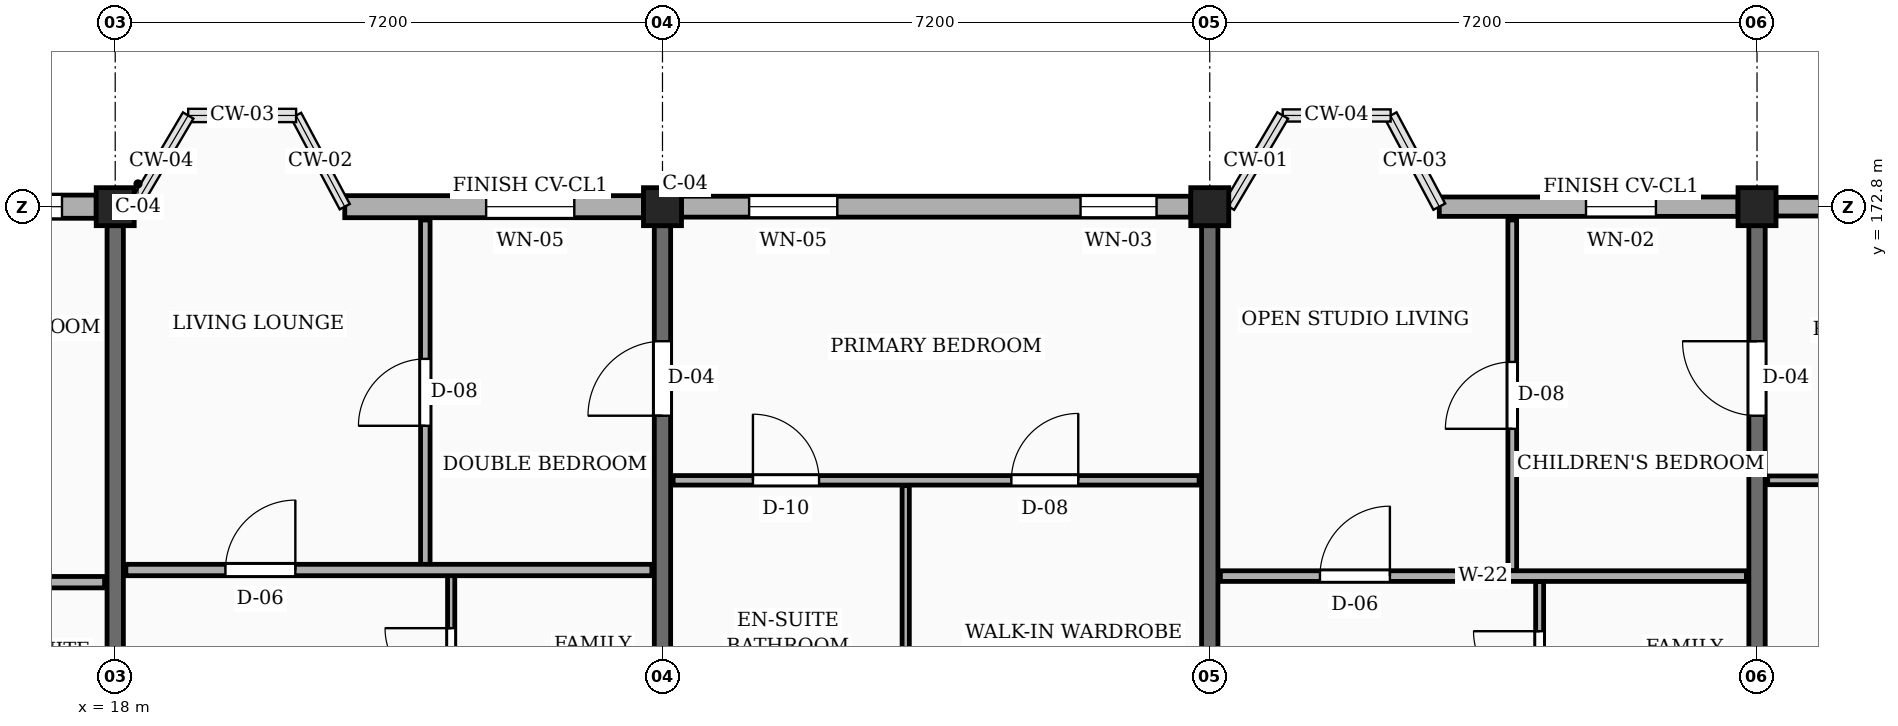
"""IFC4 building model, lengths in metres.
Left out: names, types, materials, properties, quantities, classifications, styles, units other than length and angle.
Written with IfcOpenShell. Run it as: python <this file> out.ifc"""

import sys

from ifc_helpers import new_model, si_unit, direction, frame, frame_2d, origin, origin_2d, place, context, subcontext, project, spatial, rectangle, extrude, element, fill, save


model = new_model("IFC4")
c1 = context("Model", 3, precision=1e-05, world=origin(), true_north=direction((0.0, 1.0)))
c2 = subcontext(c1, "Body", "Model", "MODEL_VIEW")
j1 = project(units=[si_unit("LENGTHUNIT", "METRE"), si_unit("PLANEANGLEUNIT", "RADIAN")], contexts=[c1])
p1 = place(None, origin())
s1 = spatial("IfcSite", under=j1, at=p1, CompositionType="ELEMENT")
p2 = place(p1, origin())
s2 = spatial("IfcBuilding", under=s1, at=p2, CompositionType="ELEMENT")
p3 = place(p2, frame((0.0, 0.0, 29.7)))
s3 = spatial("IfcBuildingStorey", under=s2, at=p3, CompositionType="ELEMENT", Elevation=29.7)
for number, where, z_axis, x_axis in (
    (1, (18.0, 172.8, 0.0), (0.0, 0.0, 1.0), (1.0, 0.0, 0.0)),
    (2, (25.2, 172.8, 0.0), (0.0, 0.0, 1.0), (1.0, 0.0, 0.0)),
    (3, (32.4, 172.8, 0.0), (0.0, 0.0, 1.0), (1.0, 0.0, 0.0)),
    (4, (39.6, 172.8, 0.0), (0.0, 0.0, 1.0), (1.0, 0.0, 0.0)),
):
    element("IfcColumn", number, at=place(p3, frame(where, z_axis=z_axis, x_axis=x_axis)), inside=s3, PredefinedType="COLUMN", context=c2, shape_type="SweptSolid", body=[
        extrude(rectangle(XDim=0.5, YDim=0.5, at=origin_2d()), origin(), (0.0, 0.0, 1.0), 3.15),
    ])
p4 = place(p3, frame((18.0, 165.9, 0.0), z_axis=(0.0, 0.0, 1.0), x_axis=(0.0, 1.0, 0.0)))
e5 = element("IfcWall", 5, at=p4, inside=s3, PredefinedType="SOLIDWALL", context=c2, shape_type="SweptSolid", body=[
    extrude(rectangle(XDim=6.65, YDim=0.215, at=frame_2d((3.325, 0.0))), origin(), (0.0, 0.0, 1.0), 2.185),
])
p5 = place(p3, frame((25.2, 165.9, 0.0), z_axis=(0.0, 0.0, 1.0), x_axis=(0.0, 1.0, 0.0)))
e6 = element("IfcWall", 6, at=p5, inside=s3, PredefinedType="SOLIDWALL", context=c2, shape_type="SweptSolid", body=[
    extrude(rectangle(XDim=6.65, YDim=0.215, at=frame_2d((3.325, 0.0))), origin(), (0.0, 0.0, 1.0), 2.185),
])
p6 = place(p5, frame((4.15, 0.0, 0.0)))
e7 = element("IfcOpeningElement", 7, at=p6, cuts=e6, PredefinedType="OPENING", context=c2, shape_type="SweptSolid", body=[
    extrude(rectangle(XDim=0.98, YDim=2.12, at=frame_2d((0.49, 1.06))), frame((0.0, 0.118, 0.0), z_axis=(0.0, -1.0, 0.0), x_axis=(1.0, 0.0, 0.0)), (0.0, 0.0, 1.0), 0.235),
])
p7 = place(p3, frame((32.4, 165.9, 0.0), z_axis=(0.0, 0.0, 1.0), x_axis=(0.0, 1.0, 0.0)))
e8 = element("IfcWall", 8, at=p7, inside=s3, PredefinedType="SOLIDWALL", context=c2, shape_type="SweptSolid", body=[
    extrude(rectangle(XDim=6.65, YDim=0.215, at=frame_2d((3.325, 0.0))), origin(), (0.0, 0.0, 1.0), 2.185),
])
p8 = place(p3, frame((39.6, 165.9, 0.0), z_axis=(0.0, 0.0, 1.0), x_axis=(0.0, 1.0, 0.0)))
e9 = element("IfcWall", 9, at=p8, inside=s3, PredefinedType="SOLIDWALL", context=c2, shape_type="SweptSolid", body=[
    extrude(rectangle(XDim=6.65, YDim=0.215, at=frame_2d((3.325, 0.0))), origin(), (0.0, 0.0, 1.0), 2.185),
])
p9 = place(p8, frame((4.15, 0.0, 0.0)))
e10 = element("IfcOpeningElement", 10, at=p9, cuts=e9, PredefinedType="OPENING", context=c2, shape_type="SweptSolid", body=[
    extrude(rectangle(XDim=0.98, YDim=2.12, at=frame_2d((0.49, 1.06))), frame((0.0, 0.118, 0.0), z_axis=(0.0, -1.0, 0.0), x_axis=(1.0, 0.0, 0.0)), (0.0, 0.0, 1.0), 0.235),
])
p10 = place(p3, frame((46.55, 172.8, 0.0), z_axis=(0.0, 0.0, 1.0), x_axis=(-1.0, 0.0, 0.0)))
e11 = element("IfcWall", 11, at=p10, inside=s3, PredefinedType="SOLIDWALL", context=c2, shape_type="SweptSolid", body=[
    extrude(rectangle(XDim=6.7, YDim=0.245, at=frame_2d((3.35, 0.0))), origin(), (0.0, 0.0, 1.0), 2.455),
])
p11 = place(p10, frame((0.45, 0.0, 0.78)))
e12 = element("IfcOpeningElement", 12, at=p11, cuts=e11, PredefinedType="OPENING", context=c2, shape_type="SweptSolid", body=[
    extrude(rectangle(XDim=1.45, YDim=1.44, at=frame_2d((0.725, 0.72))), frame((0.0, 0.133, 0.0), z_axis=(0.0, -1.0, 0.0), x_axis=(1.0, 0.0, 0.0)), (0.0, 0.0, 1.0), 0.265),
])
p12 = place(p10, frame((4.65, 0.0, 0.78)))
e13 = element("IfcOpeningElement", 13, at=p12, cuts=e11, PredefinedType="OPENING", context=c2, shape_type="SweptSolid", body=[
    extrude(rectangle(XDim=0.92, YDim=1.15, at=frame_2d((0.46, 0.575))), frame((0.0, 0.133, 0.0), z_axis=(0.0, -1.0, 0.0), x_axis=(1.0, 0.0, 0.0)), (0.0, 0.0, 1.0), 0.265),
])
p13 = place(p3, frame((39.35, 172.8, 0.0), z_axis=(0.0, 0.0, 1.0), x_axis=(-1.0, 0.0, 0.0)))
e14 = element("IfcWall", 14, at=p13, inside=s3, PredefinedType="SOLIDWALL", context=c2, shape_type="SweptSolid", body=[
    extrude(rectangle(XDim=3.93, YDim=0.255, at=frame_2d((1.965, 0.0))), origin(), (0.0, 0.0, 1.0), 2.455),
])
p14 = place(p13, frame((1.08, 0.0, 0.78)))
e15 = element("IfcOpeningElement", 15, at=p14, cuts=e14, PredefinedType="OPENING", context=c2, shape_type="SweptSolid", body=[
    extrude(rectangle(XDim=0.92, YDim=1.15, at=frame_2d((0.46, 0.575))), frame((0.0, 0.137, 0.0), z_axis=(0.0, -1.0, 0.0), x_axis=(1.0, 0.0, 0.0)), (0.0, 0.0, 1.0), 0.275),
])
p15 = place(p3, frame((32.15, 172.8, 0.0), z_axis=(0.0, 0.0, 1.0), x_axis=(-1.0, 0.0, 0.0)))
e16 = element("IfcWall", 16, at=p15, inside=s3, PredefinedType="SOLIDWALL", context=c2, shape_type="SweptSolid", body=[
    extrude(rectangle(XDim=6.7, YDim=0.275, at=frame_2d((3.35, 0.0))), origin(), (0.0, 0.0, 1.0), 2.455),
])
p16 = place(p15, frame((0.45, 0.0, 0.78)))
e17 = element("IfcOpeningElement", 17, at=p16, cuts=e16, PredefinedType="OPENING", context=c2, shape_type="SweptSolid", body=[
    extrude(rectangle(XDim=1.0, YDim=1.15, at=frame_2d((0.5, 0.575))), frame((0.0, 0.147, 0.0), z_axis=(0.0, -1.0, 0.0), x_axis=(1.0, 0.0, 0.0)), (0.0, 0.0, 1.0), 0.295),
])
p17 = place(p15, frame((4.65, 0.0, 0.78)))
e18 = element("IfcOpeningElement", 18, at=p17, cuts=e16, PredefinedType="OPENING", context=c2, shape_type="SweptSolid", body=[
    extrude(rectangle(XDim=1.16, YDim=1.15, at=frame_2d((0.58, 0.575))), frame((0.0, 0.147, 0.0), z_axis=(0.0, -1.0, 0.0), x_axis=(1.0, 0.0, 0.0)), (0.0, 0.0, 1.0), 0.295),
])
p18 = place(p3, frame((24.95, 172.8, 0.0), z_axis=(0.0, 0.0, 1.0), x_axis=(-1.0, 0.0, 0.0)))
e19 = element("IfcWall", 19, at=p18, inside=s3, PredefinedType="SOLIDWALL", context=c2, shape_type="SweptSolid", body=[
    extrude(rectangle(XDim=3.93, YDim=0.29, at=frame_2d((1.965, 0.0))), origin(), (0.0, 0.0, 1.0), 2.455),
])
p19 = place(p18, frame((0.91, 0.0, 0.78)))
e20 = element("IfcOpeningElement", 20, at=p19, cuts=e19, PredefinedType="OPENING", context=c2, shape_type="SweptSolid", body=[
    extrude(rectangle(XDim=1.16, YDim=1.15, at=frame_2d((0.58, 0.575))), frame((0.0, 0.155, 0.0), z_axis=(0.0, -1.0, 0.0), x_axis=(1.0, 0.0, 0.0)), (0.0, 0.0, 1.0), 0.31),
])
p20 = place(p3, frame((17.75, 172.8, 0.0), z_axis=(0.0, 0.0, 1.0), x_axis=(-1.0, 0.0, 0.0)))
e21 = element("IfcWall", 21, at=p20, inside=s3, PredefinedType="SOLIDWALL", context=c2, shape_type="SweptSolid", body=[
    extrude(rectangle(XDim=6.7, YDim=0.305, at=frame_2d((3.35, 0.0))), origin(), (0.0, 0.0, 1.0), 2.455),
])
p21 = place(p20, frame((0.45, 0.0, 0.78)))
e22 = element("IfcOpeningElement", 22, at=p21, cuts=e21, PredefinedType="OPENING", context=c2, shape_type="SweptSolid", body=[
    extrude(rectangle(XDim=1.24, YDim=1.15, at=frame_2d((0.62, 0.575))), frame((0.0, 0.163, 0.0), z_axis=(0.0, -1.0, 0.0), x_axis=(1.0, 0.0, 0.0)), (0.0, 0.0, 1.0), 0.325),
])
p22 = place(p20, frame((4.65, 0.0, 0.78)))
e23 = element("IfcOpeningElement", 23, at=p22, cuts=e21, PredefinedType="OPENING", context=c2, shape_type="SweptSolid", body=[
    extrude(rectangle(XDim=1.4, YDim=1.15, at=frame_2d((0.7, 0.575))), frame((0.0, 0.163, 0.0), z_axis=(0.0, -1.0, 0.0), x_axis=(1.0, 0.0, 0.0)), (0.0, 0.0, 1.0), 0.325),
])
p23 = place(p3, frame((10.975, 167.86, 0.0), z_axis=(0.0, 0.0, 1.0), x_axis=(1.0, 0.0, 0.0)))
e24 = element("IfcWall", 24, at=p23, inside=s3, PredefinedType="PARTITIONING", context=c2, shape_type="SweptSolid", body=[
    extrude(rectangle(XDim=6.885, YDim=0.15, at=frame_2d((3.442, 0.0))), origin(), (0.0, 0.0, 1.0), 2.32),
])
p24 = place(p23, frame((1.275, 0.0, 0.0)))
e25 = element("IfcOpeningElement", 25, at=p24, cuts=e24, PredefinedType="OPENING", context=c2, shape_type="SweptSolid", body=[
    extrude(rectangle(XDim=0.95, YDim=2.1, at=frame_2d((0.475, 1.05))), frame((0.0, 0.085, 0.0), z_axis=(0.0, -1.0, 0.0), x_axis=(1.0, 0.0, 0.0)), (0.0, 0.0, 1.0), 0.17),
])
p25 = place(p3, frame((22.08, 168.09, 0.0), z_axis=(0.0, 0.0, 1.0), x_axis=(0.0, 1.0, 0.0)))
e26 = element("IfcWall", 26, at=p25, inside=s3, PredefinedType="PARTITIONING", context=c2, shape_type="SweptSolid", body=[
    extrude(rectangle(XDim=4.535, YDim=0.125, at=frame_2d((2.268, 0.0))), origin(), (0.0, 0.0, 1.0), 2.32),
])
p26 = place(p25, frame((1.827, 0.0, 0.0)))
e27 = element("IfcOpeningElement", 27, at=p26, cuts=e26, PredefinedType="OPENING", context=c2, shape_type="SweptSolid", body=[
    extrude(rectangle(XDim=0.88, YDim=2.08, at=frame_2d((0.44, 1.04))), frame((0.0, 0.073, 0.0), z_axis=(0.0, -1.0, 0.0), x_axis=(1.0, 0.0, 0.0)), (0.0, 0.0, 1.0), 0.145),
])
p27 = place(p3, frame((22.42, 165.69, 0.0), z_axis=(0.0, 0.0, 1.0), x_axis=(0.0, 1.0, 0.0)))
e28 = element("IfcWall", 28, at=p27, inside=s3, PredefinedType="PARTITIONING", context=c2, shape_type="SweptSolid", body=[
    extrude(rectangle(XDim=2.26, YDim=0.095, at=frame_2d((1.13, 0.0))), origin(), (0.0, 0.0, 1.0), 2.32),
])
p28 = place(p27, frame((0.695, 0.0, 0.0)))
e29 = element("IfcOpeningElement", 29, at=p28, cuts=e28, PredefinedType="OPENING", context=c2, shape_type="SweptSolid", body=[
    extrude(rectangle(XDim=0.87, YDim=2.05, at=frame_2d((0.435, 1.025))), frame((0.0, 0.058, 0.0), z_axis=(0.0, -1.0, 0.0), x_axis=(1.0, 0.0, 0.0)), (0.0, 0.0, 1.0), 0.115),
])
p29 = place(p3, frame((18.14, 168.02, 0.0), z_axis=(0.0, 0.0, 1.0), x_axis=(1.0, 0.0, 0.0)))
e30 = element("IfcWall", 30, at=p29, inside=s3, PredefinedType="PARTITIONING", context=c2, shape_type="SweptSolid", body=[
    extrude(rectangle(XDim=6.92, YDim=0.15, at=frame_2d((3.46, 0.0))), origin(), (0.0, 0.0, 1.0), 2.32),
])
p30 = place(p29, frame((1.31, 0.0, 0.0)))
e31 = element("IfcOpeningElement", 31, at=p30, cuts=e30, PredefinedType="OPENING", context=c2, shape_type="SweptSolid", body=[
    extrude(rectangle(XDim=0.92, YDim=2.1, at=frame_2d((0.46, 1.05))), frame((0.0, 0.085, 0.0), z_axis=(0.0, -1.0, 0.0), x_axis=(1.0, 0.0, 0.0)), (0.0, 0.0, 1.0), 0.17),
])
p31 = place(p3, frame((25.34, 169.2, 0.0), z_axis=(0.0, 0.0, 1.0), x_axis=(1.0, 0.0, 0.0)))
e32 = element("IfcWall", 32, at=p31, inside=s3, PredefinedType="PARTITIONING", context=c2, shape_type="SweptSolid", body=[
    extrude(rectangle(XDim=6.92, YDim=0.125, at=frame_2d((3.46, 0.0))), origin(), (0.0, 0.0, 1.0), 2.32),
])
p32 = place(p31, frame((1.05, 0.0, 0.0)))
e33 = element("IfcOpeningElement", 33, at=p32, cuts=e32, PredefinedType="OPENING", context=c2, shape_type="SweptSolid", body=[
    extrude(rectangle(XDim=0.87, YDim=2.05, at=frame_2d((0.435, 1.025))), frame((0.0, 0.073, 0.0), z_axis=(0.0, -1.0, 0.0), x_axis=(1.0, 0.0, 0.0)), (0.0, 0.0, 1.0), 0.145),
])
p33 = place(p31, frame((4.45, 0.0, 0.0)))
e34 = element("IfcOpeningElement", 34, at=p33, cuts=e32, PredefinedType="OPENING", context=c2, shape_type="SweptSolid", body=[
    extrude(rectangle(XDim=0.88, YDim=2.08, at=frame_2d((0.44, 1.04))), frame((0.0, 0.073, 0.0), z_axis=(0.0, -1.0, 0.0), x_axis=(1.0, 0.0, 0.0)), (0.0, 0.0, 1.0), 0.145),
])
p34 = place(p3, frame((28.4, 165.74, 0.0), z_axis=(0.0, 0.0, 1.0), x_axis=(0.0, 1.0, 0.0)))
e35 = element("IfcWall", 35, at=p34, inside=s3, PredefinedType="PARTITIONING", context=c2, shape_type="SweptSolid", body=[
    extrude(rectangle(XDim=3.39, YDim=0.095, at=frame_2d((1.695, 0.0))), origin(), (0.0, 0.0, 1.0), 2.32),
])
p35 = place(p3, frame((36.38, 168.01, 0.0), z_axis=(0.0, 0.0, 1.0), x_axis=(0.0, 1.0, 0.0)))
e36 = element("IfcWall", 36, at=p35, inside=s3, PredefinedType="PARTITIONING", context=c2, shape_type="SweptSolid", body=[
    extrude(rectangle(XDim=4.615, YDim=0.115, at=frame_2d((2.308, 0.0))), origin(), (0.0, 0.0, 1.0), 2.32),
])
p36 = place(p35, frame((1.867, 0.0, 0.0)))
e37 = element("IfcOpeningElement", 37, at=p36, cuts=e36, PredefinedType="OPENING", context=c2, shape_type="SweptSolid", body=[
    extrude(rectangle(XDim=0.88, YDim=2.08, at=frame_2d((0.44, 1.04))), frame((0.0, 0.067, 0.0), z_axis=(0.0, -1.0, 0.0), x_axis=(1.0, 0.0, 0.0)), (0.0, 0.0, 1.0), 0.135),
])
p37 = place(p3, frame((36.74, 165.69, 0.0), z_axis=(0.0, 0.0, 1.0), x_axis=(0.0, 1.0, 0.0)))
e38 = element("IfcWall", 38, at=p37, inside=s3, PredefinedType="PARTITIONING", context=c2, shape_type="SweptSolid", body=[
    extrude(rectangle(XDim=2.18, YDim=0.105, at=frame_2d((1.09, 0.0))), origin(), (0.0, 0.0, 1.0), 2.32),
])
p38 = place(p37, frame((0.655, 0.0, 0.0)))
e39 = element("IfcOpeningElement", 39, at=p38, cuts=e38, PredefinedType="OPENING", context=c2, shape_type="SweptSolid", body=[
    extrude(rectangle(XDim=0.87, YDim=2.05, at=frame_2d((0.435, 1.025))), frame((0.0, 0.062, 0.0), z_axis=(0.0, -1.0, 0.0), x_axis=(1.0, 0.0, 0.0)), (0.0, 0.0, 1.0), 0.125),
])
p39 = place(p3, frame((32.54, 167.94, 0.0), z_axis=(0.0, 0.0, 1.0), x_axis=(1.0, 0.0, 0.0)))
e40 = element("IfcWall", 40, at=p39, inside=s3, PredefinedType="PARTITIONING", context=c2, shape_type="SweptSolid", body=[
    extrude(rectangle(XDim=6.92, YDim=0.14, at=frame_2d((3.46, 0.0))), origin(), (0.0, 0.0, 1.0), 2.32),
])
p40 = place(p39, frame((1.31, 0.0, 0.0)))
e41 = element("IfcOpeningElement", 41, at=p40, cuts=e40, PredefinedType="OPENING", context=c2, shape_type="SweptSolid", body=[
    extrude(rectangle(XDim=0.92, YDim=2.1, at=frame_2d((0.46, 1.05))), frame((0.0, 0.08, 0.0), z_axis=(0.0, -1.0, 0.0), x_axis=(1.0, 0.0, 0.0)), (0.0, 0.0, 1.0), 0.16),
])
p41 = place(p3, frame((39.74, 169.2, 0.0), z_axis=(0.0, 0.0, 1.0), x_axis=(1.0, 0.0, 0.0)))
e42 = element("IfcWall", 42, at=p41, inside=s3, PredefinedType="PARTITIONING", context=c2, shape_type="SweptSolid", body=[
    extrude(rectangle(XDim=6.92, YDim=0.115, at=frame_2d((3.46, 0.0))), origin(), (0.0, 0.0, 1.0), 2.32),
])
p42 = place(p41, frame((1.05, 0.0, 0.0)))
e43 = element("IfcOpeningElement", 43, at=p42, cuts=e42, PredefinedType="OPENING", context=c2, shape_type="SweptSolid", body=[
    extrude(rectangle(XDim=0.87, YDim=2.05, at=frame_2d((0.435, 1.025))), frame((0.0, 0.067, 0.0), z_axis=(0.0, -1.0, 0.0), x_axis=(1.0, 0.0, 0.0)), (0.0, 0.0, 1.0), 0.135),
])
p43 = place(p41, frame((4.45, 0.0, 0.0)))
e44 = element("IfcOpeningElement", 44, at=p43, cuts=e42, PredefinedType="OPENING", context=c2, shape_type="SweptSolid", body=[
    extrude(rectangle(XDim=0.88, YDim=2.08, at=frame_2d((0.44, 1.04))), frame((0.0, 0.067, 0.0), z_axis=(0.0, -1.0, 0.0), x_axis=(1.0, 0.0, 0.0)), (0.0, 0.0, 1.0), 0.135),
])
p44 = place(p14, origin())
e45 = element("IfcWindow", 45, at=p44, inside=s3, PartitioningType="SINGLE_PANEL", PredefinedType="WINDOW", context=c2, shape_type="SweptSolid", body=[
    extrude(rectangle(XDim=0.92, YDim=1.15, at=frame_2d((0.46, 0.575))), frame((0.0, 0.03, 0.0), z_axis=(0.0, -1.0, 0.0), x_axis=(1.0, 0.0, 0.0)), (0.0, 0.0, 1.0), 0.06),
])
fill(e15, e45)
p45 = place(p16, origin())
e46 = element("IfcWindow", 46, at=p45, inside=s3, PartitioningType="SINGLE_PANEL", PredefinedType="WINDOW", context=c2, shape_type="SweptSolid", body=[
    extrude(rectangle(XDim=1.0, YDim=1.15, at=frame_2d((0.5, 0.575))), frame((0.0, 0.03, 0.0), z_axis=(0.0, -1.0, 0.0), x_axis=(1.0, 0.0, 0.0)), (0.0, 0.0, 1.0), 0.06),
])
fill(e17, e46)
p46 = place(p17, origin())
e47 = element("IfcWindow", 47, at=p46, inside=s3, PartitioningType="SINGLE_PANEL", PredefinedType="WINDOW", context=c2, shape_type="SweptSolid", body=[
    extrude(rectangle(XDim=1.16, YDim=1.15, at=frame_2d((0.58, 0.575))), frame((0.0, 0.03, 0.0), z_axis=(0.0, -1.0, 0.0), x_axis=(1.0, 0.0, 0.0)), (0.0, 0.0, 1.0), 0.06),
])
fill(e18, e47)
p47 = place(p19, origin())
e48 = element("IfcWindow", 48, at=p47, inside=s3, PartitioningType="SINGLE_PANEL", PredefinedType="WINDOW", context=c2, shape_type="SweptSolid", body=[
    extrude(rectangle(XDim=1.16, YDim=1.15, at=frame_2d((0.58, 0.575))), frame((0.0, 0.03, 0.0), z_axis=(0.0, -1.0, 0.0), x_axis=(1.0, 0.0, 0.0)), (0.0, 0.0, 1.0), 0.06),
])
fill(e20, e48)
p48 = place(p21, origin())
e49 = element("IfcWindow", 49, at=p48, inside=s3, PartitioningType="SINGLE_PANEL", PredefinedType="WINDOW", context=c2, shape_type="SweptSolid", body=[
    extrude(rectangle(XDim=1.24, YDim=1.15, at=frame_2d((0.62, 0.575))), frame((0.0, 0.03, 0.0), z_axis=(0.0, -1.0, 0.0), x_axis=(1.0, 0.0, 0.0)), (0.0, 0.0, 1.0), 0.06),
])
fill(e22, e49)
p49 = place(p26, origin())
e50 = element("IfcDoor", 50, at=p49, inside=s3, OperationType="SINGLE_SWING_LEFT", PredefinedType="DOOR", context=c2, shape_type="SweptSolid", body=[
    extrude(rectangle(XDim=0.88, YDim=2.08, at=frame_2d((0.44, 1.04))), frame((0.0, 0.025, 0.0), z_axis=(0.0, -1.0, 0.0), x_axis=(1.0, 0.0, 0.0)), (0.0, 0.0, 1.0), 0.05),
])
fill(e27, e50)
p50 = place(p28, origin())
e51 = element("IfcDoor", 51, at=p50, inside=s3, OperationType="SINGLE_SWING_RIGHT", PredefinedType="DOOR", context=c2, shape_type="SweptSolid", body=[
    extrude(rectangle(XDim=0.87, YDim=2.05, at=frame_2d((0.435, 1.025))), frame((0.0, 0.025, 0.0), z_axis=(0.0, -1.0, 0.0), x_axis=(1.0, 0.0, 0.0)), (0.0, 0.0, 1.0), 0.05),
])
fill(e29, e51)
p51 = place(p30, origin())
e52 = element("IfcDoor", 52, at=p51, inside=s3, OperationType="SINGLE_SWING_RIGHT", PredefinedType="DOOR", context=c2, shape_type="SweptSolid", body=[
    extrude(rectangle(XDim=0.92, YDim=2.1, at=frame_2d((0.46, 1.05))), frame((0.0, 0.025, 0.0), z_axis=(0.0, -1.0, 0.0), x_axis=(1.0, 0.0, 0.0)), (0.0, 0.0, 1.0), 0.05),
])
fill(e31, e52)
p52 = place(p32, origin())
e53 = element("IfcDoor", 53, at=p52, inside=s3, OperationType="SINGLE_SWING_LEFT", PredefinedType="DOOR", context=c2, shape_type="SweptSolid", body=[
    extrude(rectangle(XDim=0.87, YDim=2.05, at=frame_2d((0.435, 1.025))), frame((0.0, 0.025, 0.0), z_axis=(0.0, -1.0, 0.0), x_axis=(1.0, 0.0, 0.0)), (0.0, 0.0, 1.0), 0.05),
])
fill(e33, e53)
p53 = place(p33, origin())
e54 = element("IfcDoor", 54, at=p53, inside=s3, OperationType="SINGLE_SWING_RIGHT", PredefinedType="DOOR", context=c2, shape_type="SweptSolid", body=[
    extrude(rectangle(XDim=0.88, YDim=2.08, at=frame_2d((0.44, 1.04))), frame((0.0, 0.025, 0.0), z_axis=(0.0, -1.0, 0.0), x_axis=(1.0, 0.0, 0.0)), (0.0, 0.0, 1.0), 0.05),
])
fill(e34, e54)
p54 = place(p36, origin())
e55 = element("IfcDoor", 55, at=p54, inside=s3, OperationType="SINGLE_SWING_LEFT", PredefinedType="DOOR", context=c2, shape_type="SweptSolid", body=[
    extrude(rectangle(XDim=0.88, YDim=2.08, at=frame_2d((0.44, 1.04))), frame((0.0, 0.025, 0.0), z_axis=(0.0, -1.0, 0.0), x_axis=(1.0, 0.0, 0.0)), (0.0, 0.0, 1.0), 0.05),
])
fill(e37, e55)
p55 = place(p38, origin())
e56 = element("IfcDoor", 56, at=p55, inside=s3, OperationType="SINGLE_SWING_RIGHT", PredefinedType="DOOR", context=c2, shape_type="SweptSolid", body=[
    extrude(rectangle(XDim=0.87, YDim=2.05, at=frame_2d((0.435, 1.025))), frame((0.0, 0.025, 0.0), z_axis=(0.0, -1.0, 0.0), x_axis=(1.0, 0.0, 0.0)), (0.0, 0.0, 1.0), 0.05),
])
fill(e39, e56)
p56 = place(p40, origin())
e57 = element("IfcDoor", 57, at=p56, inside=s3, OperationType="SINGLE_SWING_RIGHT", PredefinedType="DOOR", context=c2, shape_type="SweptSolid", body=[
    extrude(rectangle(XDim=0.92, YDim=2.1, at=frame_2d((0.46, 1.05))), frame((0.0, 0.025, 0.0), z_axis=(0.0, -1.0, 0.0), x_axis=(1.0, 0.0, 0.0)), (0.0, 0.0, 1.0), 0.05),
])
fill(e41, e57)
p57 = place(p6, origin())
e58 = element("IfcDoor", 58, at=p57, inside=s3, OperationType="SINGLE_SWING_LEFT", PredefinedType="DOOR", context=c2, shape_type="SweptSolid", body=[
    extrude(rectangle(XDim=0.98, YDim=2.12, at=frame_2d((0.49, 1.06))), frame((0.0, 0.025, 0.0), z_axis=(0.0, -1.0, 0.0), x_axis=(1.0, 0.0, 0.0)), (0.0, 0.0, 1.0), 0.05),
])
fill(e7, e58)
p58 = place(p9, origin())
e59 = element("IfcDoor", 59, at=p58, inside=s3, OperationType="SINGLE_SWING_RIGHT", PredefinedType="DOOR", context=c2, shape_type="SweptSolid", body=[
    extrude(rectangle(XDim=0.98, YDim=2.12, at=frame_2d((0.49, 1.06))), frame((0.0, 0.025, 0.0), z_axis=(0.0, -1.0, 0.0), x_axis=(1.0, 0.0, 0.0)), (0.0, 0.0, 1.0), 0.05),
])
fill(e10, e59)
save(model, sys.argv[1])
